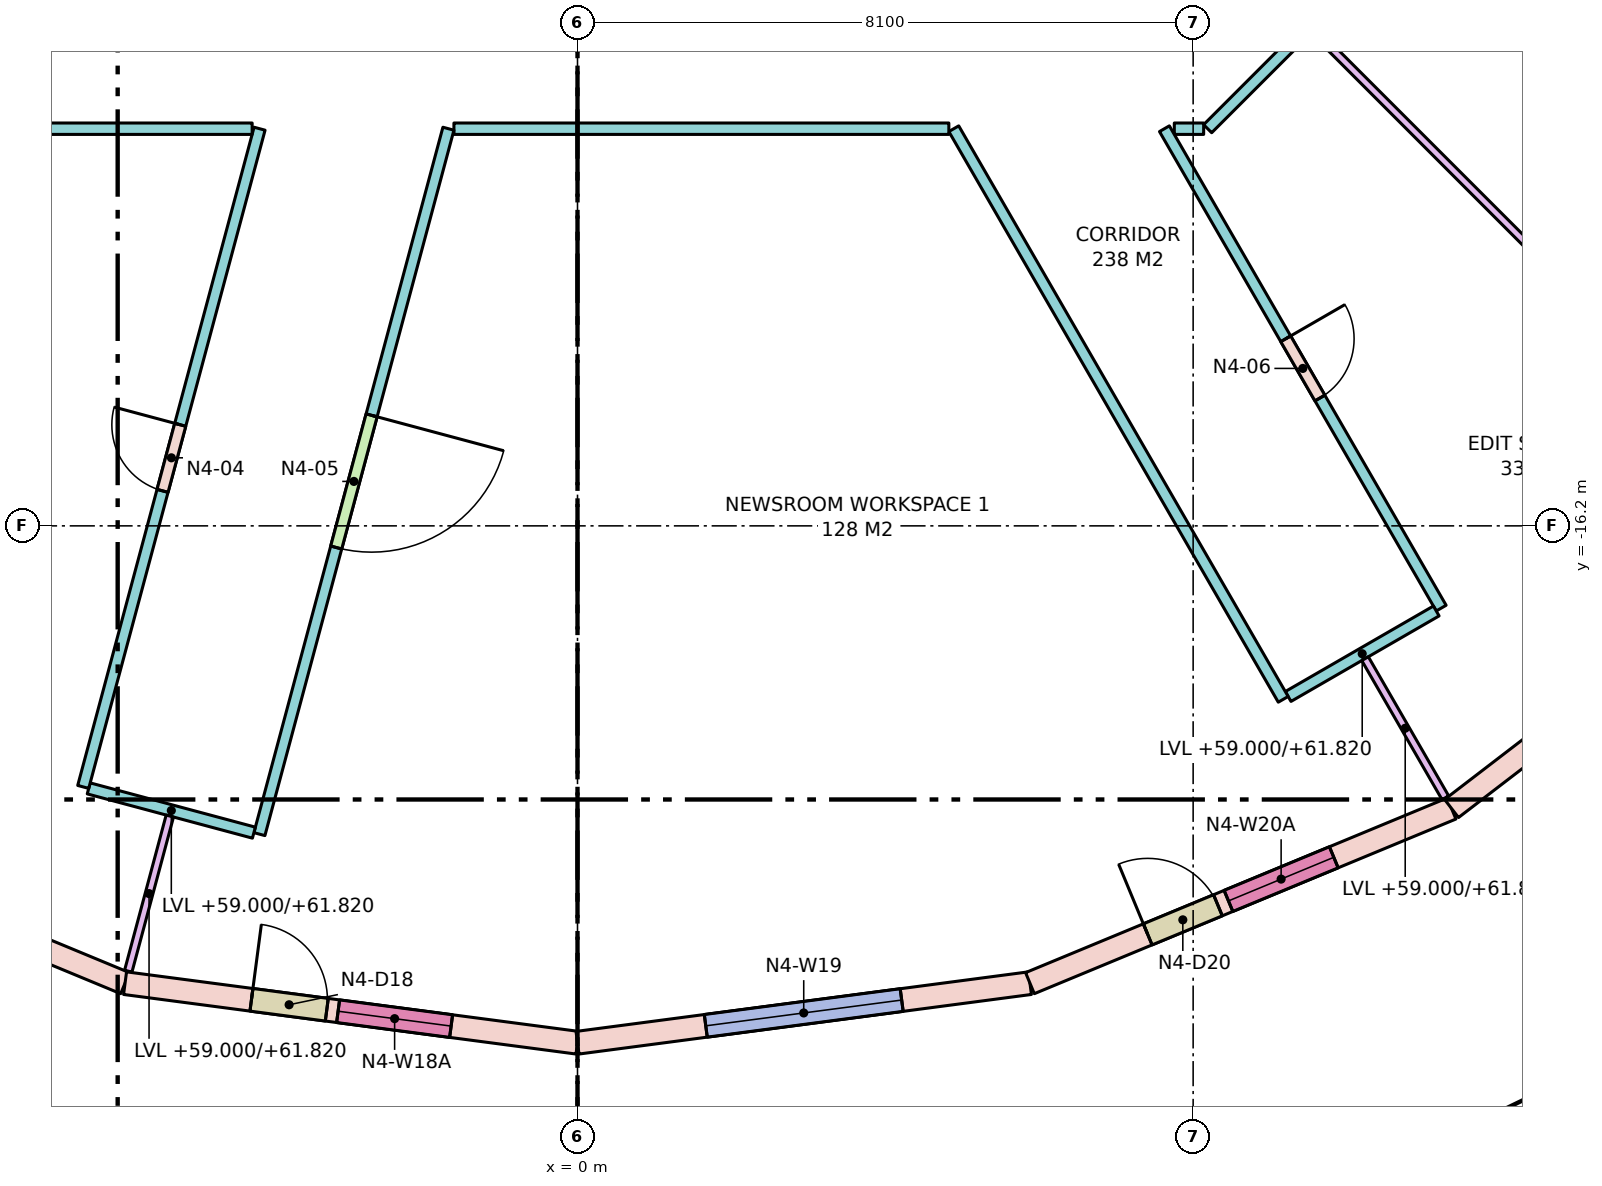
"""IFC4 building model, lengths in metres.
Left out: names, types, materials, properties, quantities, classifications, styles, units other than length and angle.
Written with IfcOpenShell. Run it as: python <this file> out.ifc"""

import sys

from ifc_helpers import new_model, si_unit, direction, frame, frame_2d, origin, place, context, subcontext, project, spatial, rectangle, extrude, element, fill, save


model = new_model("IFC4")
c1 = context("Model", 3, precision=1e-05, world=origin(), true_north=direction((0.0, 1.0)))
c2 = subcontext(c1, "Body", "Model", "MODEL_VIEW")
j1 = project(units=[si_unit("LENGTHUNIT", "METRE"), si_unit("PLANEANGLEUNIT", "RADIAN")], contexts=[c1])
p1 = place(None, origin())
s1 = spatial("IfcSite", under=j1, at=p1, CompositionType="ELEMENT")
p2 = place(p1, origin())
s2 = spatial("IfcBuilding", under=s1, at=p2, CompositionType="ELEMENT")
p3 = place(p2, frame((0.0, 0.0, 59.0)))
s3 = spatial("IfcBuildingStorey", under=s2, at=p3, CompositionType="ELEMENT", Elevation=59.0)
p4 = place(p3, frame((-11.5, -19.919, 0.0), z_axis=(0.0, 0.0, 1.0), x_axis=(0.923884511653, -0.382671411433, 0.0)))
e1 = element("IfcWall", 1, at=p4, inside=s3, PredefinedType="STANDARD", context=c2, shape_type="SweptSolid", body=[
    extrude(rectangle(XDim=6.004, YDim=0.3, at=frame_2d((3.002, 0.0))), origin(), (0.0, 0.0, 1.0), 3.72),
])
p5 = place(p4, frame((1.702, 0.0, 0.8)))
e2 = element("IfcOpeningElement", 2, at=p5, cuts=e1, PredefinedType="OPENING", context=c2, shape_type="SweptSolid", body=[
    extrude(rectangle(XDim=2.6, YDim=2.7, at=frame_2d((1.3, 1.35))), frame((0.0, 0.16, 0.0), z_axis=(0.0, -1.0, 0.0), x_axis=(1.0, 0.0, 0.0)), (0.0, 0.0, 1.0), 0.32),
])
p6 = place(p3, frame((-5.953, -22.216, 0.0), z_axis=(0.0, 0.0, 1.0), x_axis=(0.991445297315, -0.130522880875, 0.0)))
e3 = element("IfcWall", 3, at=p6, inside=s3, PredefinedType="STANDARD", context=c2, shape_type="SweptSolid", body=[
    extrude(rectangle(XDim=6.004, YDim=0.3, at=frame_2d((3.002, 0.0))), origin(), (0.0, 0.0, 1.0), 3.72),
])
p7 = place(p6, frame((1.677, 0.0, 0.0)))
e4 = element("IfcOpeningElement", 4, at=p7, cuts=e3, PredefinedType="OPENING", context=c2, shape_type="SweptSolid", body=[
    extrude(rectangle(XDim=1.0, YDim=2.4, at=frame_2d((0.5, 1.2))), frame((0.0, 0.16, 0.0), z_axis=(0.0, -1.0, 0.0), x_axis=(1.0, 0.0, 0.0)), (0.0, 0.0, 1.0), 0.32),
])
p8 = place(p6, frame((2.827, 0.0, 0.8)))
e5 = element("IfcOpeningElement", 5, at=p8, cuts=e3, PredefinedType="OPENING", context=c2, shape_type="SweptSolid", body=[
    extrude(rectangle(XDim=1.5, YDim=2.7, at=frame_2d((0.75, 1.35))), frame((0.0, 0.16, 0.0), z_axis=(0.0, -1.0, 0.0), x_axis=(1.0, 0.0, 0.0)), (0.0, 0.0, 1.0), 0.32),
])
p9 = place(p3, frame((0.0, -23.0, 0.0), z_axis=(0.0, 0.0, 1.0), x_axis=(0.991445297315, 0.130522880875, 0.0)))
e6 = element("IfcWall", 6, at=p9, inside=s3, PredefinedType="STANDARD", context=c2, shape_type="SweptSolid", body=[
    extrude(rectangle(XDim=6.004, YDim=0.3, at=frame_2d((3.002, 0.0))), origin(), (0.0, 0.0, 1.0), 3.72),
])
p10 = place(p9, frame((1.702, 0.0, 0.8)))
e7 = element("IfcOpeningElement", 7, at=p10, cuts=e6, PredefinedType="OPENING", context=c2, shape_type="SweptSolid", body=[
    extrude(rectangle(XDim=2.6, YDim=2.7, at=frame_2d((1.3, 1.35))), frame((0.0, 0.16, 0.0), z_axis=(0.0, -1.0, 0.0), x_axis=(1.0, 0.0, 0.0)), (0.0, 0.0, 1.0), 0.32),
])
p11 = place(p3, frame((5.953, -22.216, 0.0), z_axis=(0.0, 0.0, 1.0), x_axis=(0.923884511653, 0.382671411433, 0.0)))
e8 = element("IfcWall", 8, at=p11, inside=s3, PredefinedType="STANDARD", context=c2, shape_type="SweptSolid", body=[
    extrude(rectangle(XDim=6.004, YDim=0.3, at=frame_2d((3.002, 0.0))), origin(), (0.0, 0.0, 1.0), 3.72),
])
p12 = place(p11, frame((1.677, 0.0, 0.0)))
e9 = element("IfcOpeningElement", 9, at=p12, cuts=e8, PredefinedType="OPENING", context=c2, shape_type="SweptSolid", body=[
    extrude(rectangle(XDim=1.0, YDim=2.4, at=frame_2d((0.5, 1.2))), frame((0.0, 0.16, 0.0), z_axis=(0.0, -1.0, 0.0), x_axis=(1.0, 0.0, 0.0)), (0.0, 0.0, 1.0), 0.32),
])
p13 = place(p11, frame((2.827, 0.0, 0.8)))
e10 = element("IfcOpeningElement", 10, at=p13, cuts=e8, PredefinedType="OPENING", context=c2, shape_type="SweptSolid", body=[
    extrude(rectangle(XDim=1.5, YDim=2.7, at=frame_2d((0.75, 1.35))), frame((0.0, 0.16, 0.0), z_axis=(0.0, -1.0, 0.0), x_axis=(1.0, 0.0, 0.0)), (0.0, 0.0, 1.0), 0.32),
])
p14 = place(p3, frame((11.5, -19.919, 0.0), z_axis=(0.0, 0.0, 1.0), x_axis=(0.793339924758, 0.608778912074, 0.0)))
e11 = element("IfcWall", 11, at=p14, inside=s3, PredefinedType="STANDARD", context=c2, shape_type="SweptSolid", body=[
    extrude(rectangle(XDim=6.004, YDim=0.3, at=frame_2d((3.002, 0.0))), origin(), (0.0, 0.0, 1.0), 3.72),
])
p15 = place(p14, frame((1.702, 0.0, 0.8)))
e12 = element("IfcOpeningElement", 12, at=p15, cuts=e11, PredefinedType="OPENING", context=c2, shape_type="SweptSolid", body=[
    extrude(rectangle(XDim=2.6, YDim=2.7, at=frame_2d((1.3, 1.35))), frame((0.0, 0.16, 0.0), z_axis=(0.0, -1.0, 0.0), x_axis=(1.0, 0.0, 0.0)), (0.0, 0.0, 1.0), 0.32),
])
p16 = place(p3, frame((12.938, -6.328, 0.0), z_axis=(0.0, 0.0, 1.0), x_axis=(-0.707088206597, -0.707125355289, 0.0)))
e13 = element("IfcWall", 13, at=p16, inside=s3, PredefinedType="PARTITIONING", context=c2, shape_type="SweptSolid", body=[
    extrude(rectangle(XDim=6.572, YDim=0.15, at=frame_2d((3.286, 0.0))), origin(), (0.0, 0.0, 1.0), 2.82),
])
p17 = place(p16, frame((2.398, 0.0, 0.0)))
e14 = element("IfcOpeningElement", 14, at=p17, cuts=e13, PredefinedType="OPENING", context=c2, shape_type="SweptSolid", body=[
    extrude(rectangle(XDim=0.9, YDim=2.1, at=frame_2d((0.45, 1.05))), frame((0.0, 0.085, 0.0), z_axis=(0.0, -1.0, 0.0), x_axis=(1.0, 0.0, 0.0)), (0.0, 0.0, 1.0), 0.17),
])
p18 = place(p3, frame((8.238, -10.975, 0.0), z_axis=(0.0, 0.0, 1.0), x_axis=(-1.0, 0.0, 0.0)))
e15 = element("IfcWall", 15, at=p18, inside=s3, PredefinedType="PARTITIONING", context=c2, shape_type="SweptSolid", body=[
    extrude(rectangle(XDim=0.386, YDim=0.15, at=frame_2d((0.193, 0.0))), origin(), (0.0, 0.0, 1.0), 3.72),
])
p19 = place(p3, frame((7.722, -10.975, 0.0), z_axis=(0.0, 0.0, 1.0), x_axis=(0.499993290699, -0.866029277366, 0.0)))
e16 = element("IfcWall", 16, at=p19, inside=s3, PredefinedType="PARTITIONING", context=c2, shape_type="SweptSolid", body=[
    extrude(rectangle(XDim=7.283, YDim=0.15, at=frame_2d((3.641, 0.0))), origin(), (0.0, 0.0, 1.0), 3.72),
])
p20 = place(p19, frame((3.191, 0.0, 0.0)))
e17 = element("IfcOpeningElement", 17, at=p20, cuts=e16, PredefinedType="OPENING", context=c2, shape_type="SweptSolid", body=[
    extrude(rectangle(XDim=0.9, YDim=2.1, at=frame_2d((0.45, 1.05))), frame((0.0, 0.085, 0.0), z_axis=(0.0, -1.0, 0.0), x_axis=(1.0, 0.0, 0.0)), (0.0, 0.0, 1.0), 0.17),
])
p21 = place(p3, frame((11.299, -17.32, 0.0), z_axis=(0.0, 0.0, 1.0), x_axis=(-0.866017533419, -0.500013631625, 0.0)))
e18 = element("IfcWall", 18, at=p21, inside=s3, PredefinedType="PARTITIONING", context=c2, shape_type="SweptSolid", body=[
    extrude(rectangle(XDim=2.25, YDim=0.15, at=frame_2d((1.125, 0.0))), origin(), (0.0, 0.0, 1.0), 2.82),
])
p22 = place(p3, frame((9.285, -18.482, 0.0), z_axis=(0.0, 0.0, 1.0), x_axis=(-0.500010122307, 0.866019559589, 0.0)))
e19 = element("IfcWall", 19, at=p22, inside=s3, PredefinedType="PARTITIONING", context=c2, shape_type="SweptSolid", body=[
    extrude(rectangle(XDim=8.669, YDim=0.15, at=frame_2d((4.334, 0.0))), origin(), (0.0, 0.0, 1.0), 3.72),
])
p23 = place(p3, frame((4.886, -10.975, 0.0), z_axis=(0.0, 0.0, 1.0), x_axis=(-1.0, 0.0, 0.0)))
e20 = element("IfcWall", 20, at=p23, inside=s3, PredefinedType="PARTITIONING", context=c2, shape_type="SweptSolid", body=[
    extrude(rectangle(XDim=6.512, YDim=0.15, at=frame_2d((3.256, 0.0))), origin(), (0.0, 0.0, 1.0), 2.82),
])
p24 = place(p3, frame((-1.698, -10.975, 0.0), z_axis=(0.0, 0.0, 1.0), x_axis=(-0.258829650889, -0.965922984415, 0.0)))
e21 = element("IfcWall", 21, at=p24, inside=s3, PredefinedType="PARTITIONING", context=c2, shape_type="SweptSolid", body=[
    extrude(rectangle(XDim=9.608, YDim=0.15, at=frame_2d((4.804, 0.0))), origin(), (0.0, 0.0, 1.0), 3.72),
])
p25 = place(p24, frame((3.904, 0.0, 0.0)))
e22 = element("IfcOpeningElement", 22, at=p25, cuts=e21, PredefinedType="OPENING", context=c2, shape_type="SweptSolid", body=[
    extrude(rectangle(XDim=1.8, YDim=2.1, at=frame_2d((0.9, 1.05))), frame((0.0, 0.085, 0.0), z_axis=(0.0, -1.0, 0.0), x_axis=(1.0, 0.0, 0.0)), (0.0, 0.0, 1.0), 0.17),
])
p26 = place(p3, frame((-4.258, -20.236, 0.0), z_axis=(0.0, 0.0, 1.0), x_axis=(-0.965906393436, 0.258891558609, 0.0)))
e23 = element("IfcWall", 23, at=p26, inside=s3, PredefinedType="PARTITIONING", context=c2, shape_type="SweptSolid", body=[
    extrude(rectangle(XDim=2.25, YDim=0.15, at=frame_2d((1.125, 0.0))), origin(), (0.0, 0.0, 1.0), 2.82),
])
p27 = place(p3, frame((-6.503, -19.635, 0.0), z_axis=(0.0, 0.0, 1.0), x_axis=(0.258821842436, 0.965925076742, 0.0)))
e24 = element("IfcWall", 24, at=p27, inside=s3, PredefinedType="PARTITIONING", context=c2, shape_type="SweptSolid", body=[
    extrude(rectangle(XDim=8.965, YDim=0.15, at=frame_2d((4.482, 0.0))), origin(), (0.0, 0.0, 1.0), 3.72),
])
p28 = place(p27, frame((4.032, 0.0, 0.0)))
e25 = element("IfcOpeningElement", 25, at=p28, cuts=e24, PredefinedType="OPENING", context=c2, shape_type="SweptSolid", body=[
    extrude(rectangle(XDim=0.9, YDim=2.1, at=frame_2d((0.45, 1.05))), frame((0.0, 0.085, 0.0), z_axis=(0.0, -1.0, 0.0), x_axis=(1.0, 0.0, 0.0)), (0.0, 0.0, 1.0), 0.17),
])
p29 = place(p3, frame((-4.281, -10.975, 0.0), z_axis=(0.0, 0.0, 1.0), x_axis=(-1.0, 0.0, 0.0)))
e26 = element("IfcWall", 26, at=p29, inside=s3, PredefinedType="PARTITIONING", context=c2, shape_type="SweptSolid", body=[
    extrude(rectangle(XDim=3.958, YDim=0.15, at=frame_2d((1.979, 0.0))), origin(), (0.0, 0.0, 1.0), 2.82),
])
for number, where, z_axis, x_axis in (
    (27, (-5.364, -20.018, 0.0), (0.0, 0.0, 1.0), (-0.259, -0.966, 0.0)),
    (28, (10.362, -17.947, 0.0), (0.0, 0.0, 1.0), (0.5, -0.866, 0.0)),
):
    element("IfcWall", number, at=place(p3, frame(where, z_axis=z_axis, x_axis=x_axis)), inside=s3, PredefinedType="PARTITIONING", context=c2, shape_type="SweptSolid", body=[
        extrude(rectangle(XDim=2.113, YDim=0.1, at=frame_2d((1.057, 0.0))), origin(), (0.0, 0.0, 1.0), 2.82),
    ])
p30 = place(p3, frame((9.686, -9.686, 0.0), z_axis=(0.0, 0.0, 1.0), x_axis=(0.707106781187, -0.707106781187, 0.0)))
e29 = element("IfcWall", 29, at=p30, inside=s3, PredefinedType="PARTITIONING", context=c2, shape_type="SweptSolid", body=[
    extrude(rectangle(XDim=9.138, YDim=0.1, at=frame_2d((4.569, 0.0))), origin(), (0.0, 0.0, 1.0), 2.82),
])
p31 = place(p3, frame((12.294, -7.098, 0.0), z_axis=(0.0, 0.0, 1.0), x_axis=(0.866010547425, -0.500025731086, 0.0)))
e30 = element("IfcWall", 30, at=p31, inside=s3, PredefinedType="PARTITIONING", context=c2, shape_type="SweptSolid", body=[
    extrude(rectangle(XDim=8.641, YDim=0.1, at=frame_2d((4.32, 0.0))), origin(), (0.0, 0.0, 1.0), 2.82),
])
p32 = place(p7, origin())
e31 = element("IfcDoor", 31, at=p32, inside=s3, OperationType="SINGLE_SWING_LEFT", PredefinedType="DOOR", context=c2, shape_type="SweptSolid", body=[
    extrude(rectangle(XDim=1.0, YDim=2.4, at=frame_2d((0.5, 1.2))), frame((0.0, 0.025, 0.0), z_axis=(0.0, -1.0, 0.0), x_axis=(1.0, 0.0, 0.0)), (0.0, 0.0, 1.0), 0.05),
])
fill(e4, e31)
p33 = place(p8, origin())
e32 = element("IfcWindow", 32, at=p33, inside=s3, PartitioningType="SINGLE_PANEL", PredefinedType="WINDOW", context=c2, shape_type="SweptSolid", body=[
    extrude(rectangle(XDim=1.5, YDim=2.7, at=frame_2d((0.75, 1.35))), frame((0.0, 0.03, 0.0), z_axis=(0.0, -1.0, 0.0), x_axis=(1.0, 0.0, 0.0)), (0.0, 0.0, 1.0), 0.06),
])
fill(e5, e32)
p34 = place(p10, origin())
e33 = element("IfcWindow", 33, at=p34, inside=s3, PartitioningType="SINGLE_PANEL", PredefinedType="WINDOW", context=c2, shape_type="SweptSolid", body=[
    extrude(rectangle(XDim=2.6, YDim=2.7, at=frame_2d((1.3, 1.35))), frame((0.0, 0.03, 0.0), z_axis=(0.0, -1.0, 0.0), x_axis=(1.0, 0.0, 0.0)), (0.0, 0.0, 1.0), 0.06),
])
fill(e7, e33)
p35 = place(p12, origin())
e34 = element("IfcDoor", 34, at=p35, inside=s3, OperationType="SINGLE_SWING_LEFT", PredefinedType="DOOR", context=c2, shape_type="SweptSolid", body=[
    extrude(rectangle(XDim=1.0, YDim=2.4, at=frame_2d((0.5, 1.2))), frame((0.0, 0.025, 0.0), z_axis=(0.0, -1.0, 0.0), x_axis=(1.0, 0.0, 0.0)), (0.0, 0.0, 1.0), 0.05),
])
fill(e9, e34)
p36 = place(p13, origin())
e35 = element("IfcWindow", 35, at=p36, inside=s3, PartitioningType="SINGLE_PANEL", PredefinedType="WINDOW", context=c2, shape_type="SweptSolid", body=[
    extrude(rectangle(XDim=1.5, YDim=2.7, at=frame_2d((0.75, 1.35))), frame((0.0, 0.03, 0.0), z_axis=(0.0, -1.0, 0.0), x_axis=(1.0, 0.0, 0.0)), (0.0, 0.0, 1.0), 0.06),
])
fill(e10, e35)
p37 = place(p28, origin())
e36 = element("IfcDoor", 36, at=p37, inside=s3, OperationType="SINGLE_SWING_RIGHT", PredefinedType="DOOR", context=c2, shape_type="SweptSolid", body=[
    extrude(rectangle(XDim=0.9, YDim=2.1, at=frame_2d((0.45, 1.05))), frame((0.0, 0.025, 0.0), z_axis=(0.0, -1.0, 0.0), x_axis=(1.0, 0.0, 0.0)), (0.0, 0.0, 1.0), 0.05),
])
fill(e25, e36)
p38 = place(p25, origin())
e37 = element("IfcDoor", 37, at=p38, inside=s3, OperationType="DOUBLE_DOOR_SINGLE_SWING", PredefinedType="DOOR", context=c2, shape_type="SweptSolid", body=[
    extrude(rectangle(XDim=1.8, YDim=2.1, at=frame_2d((0.9, 1.05))), frame((0.0, 0.025, 0.0), z_axis=(0.0, -1.0, 0.0), x_axis=(1.0, 0.0, 0.0)), (0.0, 0.0, 1.0), 0.05),
])
fill(e22, e37)
p39 = place(p20, origin())
e38 = element("IfcDoor", 38, at=p39, inside=s3, OperationType="SINGLE_SWING_LEFT", PredefinedType="DOOR", context=c2, shape_type="SweptSolid", body=[
    extrude(rectangle(XDim=0.9, YDim=2.1, at=frame_2d((0.45, 1.05))), frame((0.0, 0.025, 0.0), z_axis=(0.0, -1.0, 0.0), x_axis=(1.0, 0.0, 0.0)), (0.0, 0.0, 1.0), 0.05),
])
fill(e17, e38)
save(model, sys.argv[1])
